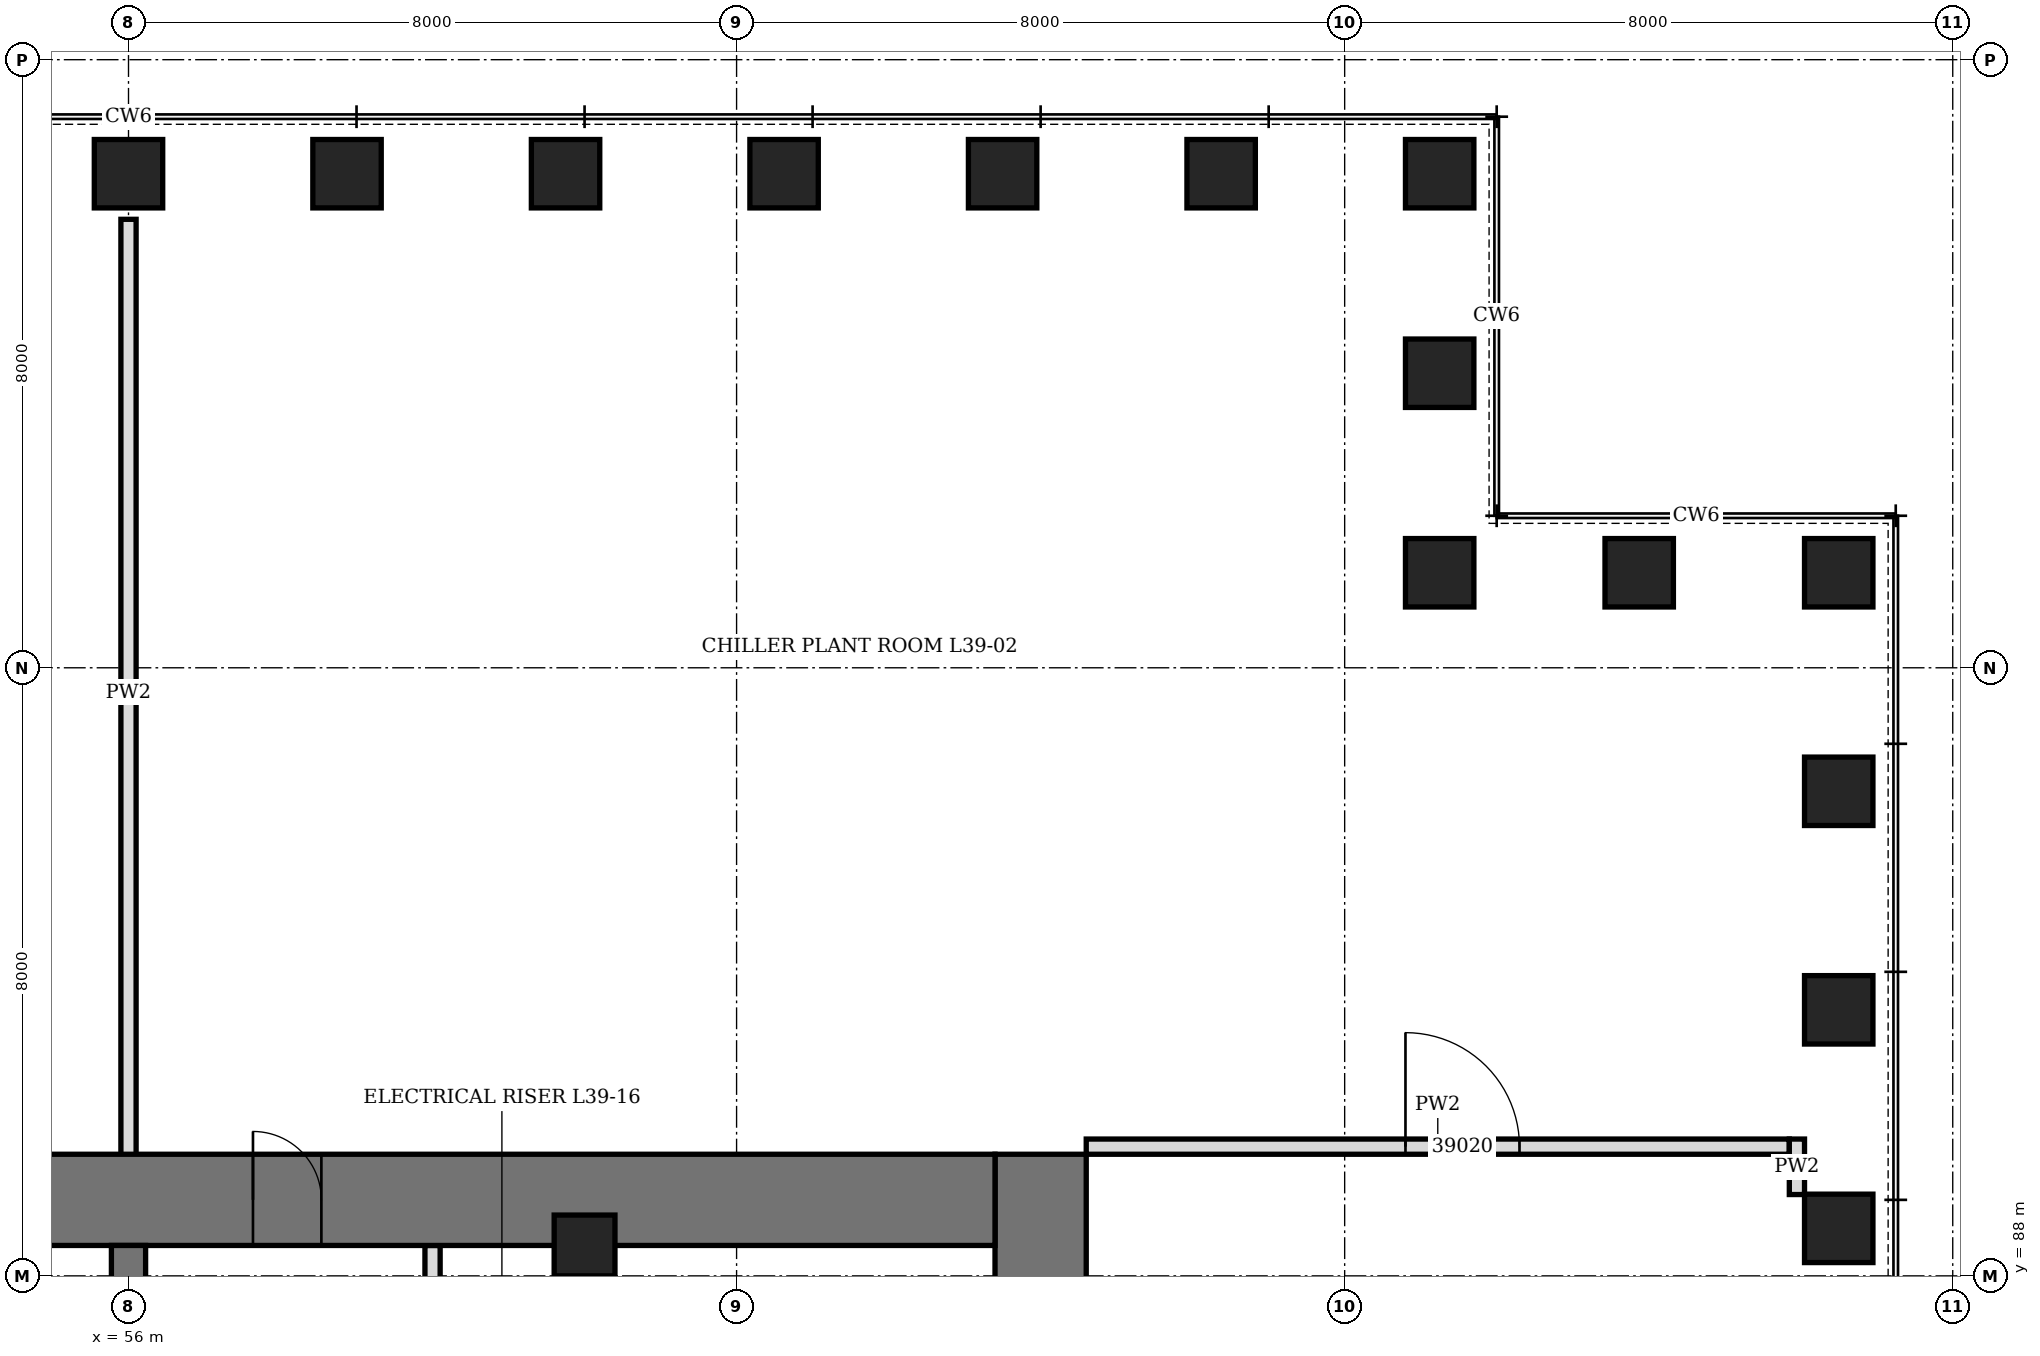
"""IFC4 building model, lengths in metres.
Left out: names, types, materials, properties, quantities, classifications, styles, units other than length and angle.
Written with IfcOpenShell. Run it as: python <this file> out.ifc"""

import sys

from ifc_helpers import new_model, si_unit, direction, frame, frame_2d, origin, origin_2d, place, context, subcontext, project, spatial, rectangle, hollow_rectangle, extrude, element, fill, save


model = new_model("IFC4")
c1 = context("Model", 3, precision=1e-05, world=origin(), true_north=direction((0.0, 1.0)))
c2 = subcontext(c1, "Body", "Model", "MODEL_VIEW")
j1 = project(units=[si_unit("LENGTHUNIT", "METRE"), si_unit("PLANEANGLEUNIT", "RADIAN")], contexts=[c1])
p1 = place(None, origin())
s1 = spatial("IfcSite", under=j1, at=p1, CompositionType="ELEMENT")
p2 = place(p1, origin())
s2 = spatial("IfcBuilding", under=s1, at=p2, CompositionType="ELEMENT")
p3 = place(p2, frame((0.0, 0.0, 175.3)))
s3 = spatial("IfcBuildingStorey", under=s2, at=p3, CompositionType="ELEMENT", Elevation=175.3)
for number, where, z_axis, x_axis in (
    (1, (78.5, 88.625, 0.0), (0.0, 0.0, 1.0), (0.0, 1.0, 0.0)),
    (2, (78.5, 91.5, 0.0), (0.0, 0.0, 1.0), (0.0, 1.0, 0.0)),
    (3, (78.5, 94.375, 0.0), (0.0, 0.0, 1.0), (0.0, 1.0, 0.0)),
    (4, (78.5, 97.25, 0.0), (0.0, 0.0, 1.0), (1.0, 0.0, 0.0)),
    (5, (75.875, 97.25, 0.0), (0.0, 0.0, 1.0), (1.0, 0.0, 0.0)),
    (6, (73.25, 97.25, 0.0), (0.0, 0.0, 1.0), (0.0, 1.0, 0.0)),
    (7, (73.25, 99.875, 0.0), (0.0, 0.0, 1.0), (0.0, 1.0, 0.0)),
    (8, (73.25, 102.5, 0.0), (0.0, 0.0, 1.0), (1.0, 0.0, 0.0)),
    (9, (70.375, 102.5, 0.0), (0.0, 0.0, 1.0), (1.0, 0.0, 0.0)),
    (10, (67.5, 102.5, 0.0), (0.0, 0.0, 1.0), (1.0, 0.0, 0.0)),
    (11, (64.625, 102.5, 0.0), (0.0, 0.0, 1.0), (1.0, 0.0, 0.0)),
    (12, (61.75, 102.5, 0.0), (0.0, 0.0, 1.0), (1.0, 0.0, 0.0)),
    (13, (58.875, 102.5, 0.0), (0.0, 0.0, 1.0), (1.0, 0.0, 0.0)),
    (14, (56.0, 102.5, 0.0), (0.0, 0.0, 1.0), (1.0, 0.0, 0.0)),
):
    element("IfcColumn", number, at=place(p3, frame(where, z_axis=z_axis, x_axis=x_axis)), inside=s3, PredefinedType="COLUMN", context=c2, shape_type="SweptSolid", body=[
        extrude(hollow_rectangle(XDim=0.9, YDim=0.9, WallThickness=0.12, at=origin_2d()), origin(), (0.0, 0.0, 1.0), 5.75),
    ])
p4 = place(p3, frame((68.0, 70.4, 0.0), z_axis=(0.0, 0.0, 1.0), x_axis=(0.0, 1.0, 0.0)))
e15 = element("IfcWall", 15, at=p4, inside=s3, PredefinedType="SHEAR", context=c2, shape_type="SweptSolid", body=[
    extrude(rectangle(XDim=19.2, YDim=1.2, at=frame_2d((9.6, 0.0))), origin(), (0.0, 0.0, 1.0), 6.0),
])
p5 = place(p4, frame((8.6, 0.0, 0.0)))
e16 = element("IfcOpeningElement", 16, at=p5, cuts=e15, PredefinedType="OPENING", context=c2, shape_type="SweptSolid", body=[
    extrude(rectangle(XDim=2.0, YDim=2.4, at=frame_2d((1.0, 1.2))), frame((0.0, 0.61, 0.0), z_axis=(0.0, -1.0, 0.0), x_axis=(1.0, 0.0, 0.0)), (0.0, 0.0, 1.0), 1.22),
])
p6 = place(p3, frame((44.6, 89.0, 0.0), z_axis=(0.0, 0.0, 1.0), x_axis=(1.0, 0.0, 0.0)))
e17 = element("IfcWall", 17, at=p6, inside=s3, PredefinedType="SHEAR", context=c2, shape_type="SweptSolid", body=[
    extrude(rectangle(XDim=22.8, YDim=1.2, at=frame_2d((11.4, 0.0))), origin(), (0.0, 0.0, 1.0), 6.0),
])
p7 = place(p6, frame((6.825, 0.0, 0.0)))
e18 = element("IfcOpeningElement", 18, at=p7, cuts=e17, PredefinedType="OPENING", context=c2, shape_type="SweptSolid", body=[
    extrude(rectangle(XDim=1.0, YDim=2.1, at=frame_2d((0.5, 1.05))), frame((0.0, 0.61, 0.0), z_axis=(0.0, -1.0, 0.0), x_axis=(1.0, 0.0, 0.0)), (0.0, 0.0, 1.0), 1.22),
])
p8 = place(p6, frame((13.038, 0.0, 0.0)))
e19 = element("IfcOpeningElement", 19, at=p8, cuts=e17, PredefinedType="OPENING", context=c2, shape_type="SweptSolid", body=[
    extrude(rectangle(XDim=0.9, YDim=2.1, at=frame_2d((0.45, 1.05))), frame((0.0, 0.61, 0.0), z_axis=(0.0, -1.0, 0.0), x_axis=(1.0, 0.0, 0.0)), (0.0, 0.0, 1.0), 1.22),
])
p9 = place(p3, frame((62.0, 71.6, 0.0), z_axis=(0.0, 0.0, 1.0), x_axis=(0.0, 1.0, 0.0)))
e20 = element("IfcWall", 20, at=p9, inside=s3, PredefinedType="SHEAR", context=c2, shape_type="SweptSolid", body=[
    extrude(rectangle(XDim=16.8, YDim=0.55, at=frame_2d((8.4, 0.0))), origin(), (0.0, 0.0, 1.0), 6.0),
])
p10 = place(p9, frame((7.5, 0.0, 0.0)))
e21 = element("IfcOpeningElement", 21, at=p10, cuts=e20, PredefinedType="OPENING", context=c2, shape_type="SweptSolid", body=[
    extrude(rectangle(XDim=1.8, YDim=2.4, at=frame_2d((0.9, 1.2))), frame((0.0, 0.285, 0.0), z_axis=(0.0, -1.0, 0.0), x_axis=(1.0, 0.0, 0.0)), (0.0, 0.0, 1.0), 0.57),
])
p11 = place(p3, frame((56.0, 86.275, 0.0), z_axis=(0.0, 0.0, 1.0), x_axis=(0.0, 1.0, 0.0)))
e22 = element("IfcWall", 22, at=p11, inside=s3, PredefinedType="SHEAR", context=c2, shape_type="SweptSolid", body=[
    extrude(rectangle(XDim=2.125, YDim=0.45, at=frame_2d((1.062, 0.0))), origin(), (0.0, 0.0, 1.0), 6.0),
])
p12 = place(p3, frame((62.0, 88.4, 0.0), z_axis=(0.0, 0.0, 1.0), x_axis=(1.0, 0.0, 0.0)))
e23 = element("IfcColumn", 23, at=p12, inside=s3, PredefinedType="COLUMN", context=c2, shape_type="SweptSolid", body=[
    extrude(hollow_rectangle(XDim=0.8, YDim=0.8, WallThickness=0.1, at=origin_2d()), origin(), (0.0, 0.0, 1.0), 6.0),
])
p13 = place(p3, frame((60.0, 86.275, 0.0), z_axis=(0.0, 0.0, 1.0), x_axis=(0.0, 1.0, 0.0)))
e24 = element("IfcWall", 24, at=p13, inside=s3, PredefinedType="PARTITIONING", context=c2, shape_type="SweptSolid", body=[
    extrude(rectangle(XDim=2.125, YDim=0.2, at=frame_2d((1.062, 0.0))), origin(), (0.0, 0.0, 1.0), 5.75),
])
p14 = place(p13, frame((0.613, 0.0, 0.0)))
e25 = element("IfcOpeningElement", 25, at=p14, cuts=e24, PredefinedType="OPENING", context=c2, shape_type="SweptSolid", body=[
    extrude(rectangle(XDim=0.9, YDim=2.1, at=frame_2d((0.45, 1.05))), frame((0.0, 0.11, 0.0), z_axis=(0.0, -1.0, 0.0), x_axis=(1.0, 0.0, 0.0)), (0.0, 0.0, 1.0), 0.22),
])
p15 = place(p3, frame((56.0, 89.45, 0.0), z_axis=(0.0, 0.0, 1.0), x_axis=(0.0, 1.0, 0.0)))
e26 = element("IfcWall", 26, at=p15, inside=s3, PredefinedType="PARTITIONING", context=c2, shape_type="SweptSolid", body=[
    extrude(rectangle(XDim=12.45, YDim=0.2, at=frame_2d((6.225, 0.0))), origin(), (0.0, 0.0, 1.0), 4.25),
])
p16 = place(p3, frame((68.6, 89.7, 0.0), z_axis=(0.0, 0.0, 1.0), x_axis=(1.0, 0.0, 0.0)))
e27 = element("IfcWall", 27, at=p16, inside=s3, PredefinedType="PARTITIONING", context=c2, shape_type="SweptSolid", body=[
    extrude(rectangle(XDim=9.25, YDim=0.2, at=frame_2d((4.625, 0.0))), origin(), (0.0, 0.0, 1.0), 5.75),
])
p17 = place(p16, frame((4.2, 0.0, 0.0)))
e28 = element("IfcOpeningElement", 28, at=p17, cuts=e27, PredefinedType="OPENING", context=c2, shape_type="SweptSolid", body=[
    extrude(rectangle(XDim=1.5, YDim=2.4, at=frame_2d((0.75, 1.2))), frame((0.0, 0.11, 0.0), z_axis=(0.0, -1.0, 0.0), x_axis=(1.0, 0.0, 0.0)), (0.0, 0.0, 1.0), 0.22),
])
p18 = place(p3, frame((77.95, 89.8, 0.0), z_axis=(0.0, 0.0, 1.0), x_axis=(0.0, -1.0, 0.0)))
e29 = element("IfcWall", 29, at=p18, inside=s3, PredefinedType="PARTITIONING", context=c2, shape_type="SweptSolid", body=[
    extrude(rectangle(XDim=0.73, YDim=0.2, at=frame_2d((0.365, 0.0))), origin(), (0.0, 0.0, 1.0), 3.25),
])
p19 = place(p8, origin())
e30 = element("IfcDoor", 30, at=p19, inside=s3, OperationType="SINGLE_SWING_LEFT", PredefinedType="DOOR", context=c2, shape_type="SweptSolid", body=[
    extrude(rectangle(XDim=0.9, YDim=2.1, at=frame_2d((0.45, 1.05))), frame((0.0, 0.35, 0.0), z_axis=(0.0, -1.0, 0.0), x_axis=(1.0, 0.0, 0.0)), (0.0, 0.0, 1.0), 0.7),
])
fill(e19, e30)
p20 = place(p17, origin())
e31 = element("IfcDoor", 31, at=p20, inside=s3, OperationType="DOUBLE_DOOR_SINGLE_SWING", PredefinedType="DOOR", context=c2, shape_type="SweptSolid", body=[
    extrude(rectangle(XDim=1.5, YDim=2.4, at=frame_2d((0.75, 1.2))), frame((0.0, 0.1, 0.0), z_axis=(0.0, -1.0, 0.0), x_axis=(1.0, 0.0, 0.0)), (0.0, 0.0, 1.0), 0.199),
])
fill(e28, e31)
save(model, sys.argv[1])
